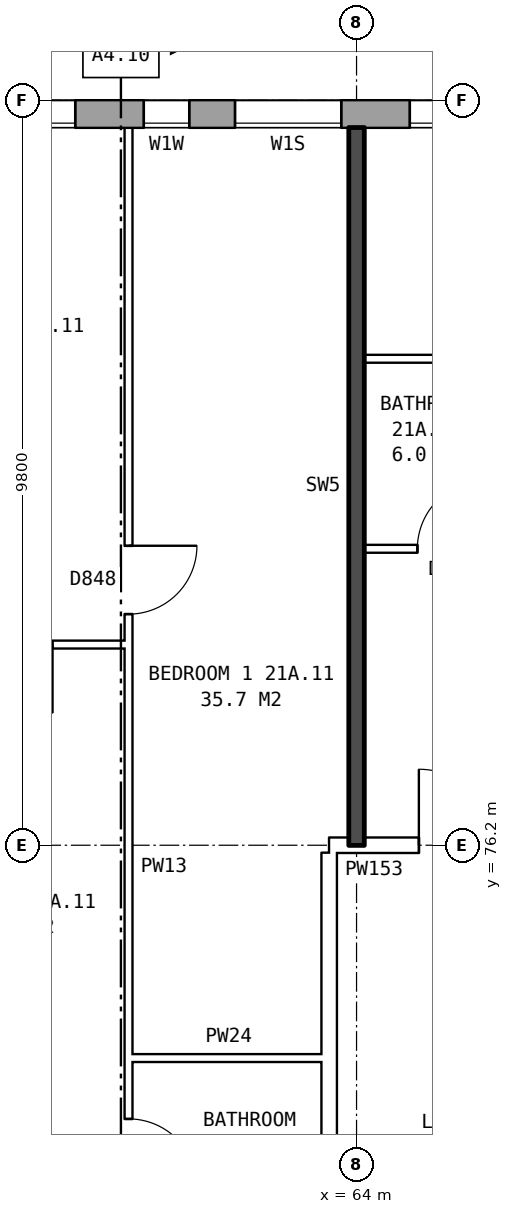
"""IFC4 building model, lengths in metres.
Left out: names, types, materials, properties, quantities, classifications, styles, units other than length and angle.
Written with IfcOpenShell. Run it as: python <this file> out.ifc"""

import sys

from ifc_helpers import new_model, si_unit, direction, frame, frame_2d, origin, place, context, subcontext, project, spatial, rectangle, extrude, element, fill, save


model = new_model("IFC4")
c1 = context("Model", 3, precision=1e-05, world=origin(), true_north=direction((0.0, 1.0)))
c2 = subcontext(c1, "Body", "Model", "MODEL_VIEW")
j1 = project(units=[si_unit("LENGTHUNIT", "METRE"), si_unit("PLANEANGLEUNIT", "RADIAN")], contexts=[c1])
p1 = place(None, origin())
s1 = spatial("IfcSite", under=j1, at=p1, CompositionType="ELEMENT")
p2 = place(p1, origin())
s2 = spatial("IfcBuilding", under=s1, at=p2, CompositionType="ELEMENT")
p3 = place(p2, frame((0.0, 0.0, 77.8)))
s3 = spatial("IfcBuildingStorey", under=s2, at=p3, CompositionType="ELEMENT", Elevation=77.8)
p4 = place(p3, frame((72.925, 85.82, 0.0), z_axis=(0.0, 0.0, 1.0), x_axis=(-1.0, 0.0, 0.0)))
e1 = element("IfcWall", 1, at=p4, inside=s3, PredefinedType="STANDARD", context=c2, shape_type="SweptSolid", body=[
    extrude(rectangle(XDim=46.601, YDim=0.36, at=frame_2d((23.3, 0.0))), origin(), (0.0, 0.0, 1.0), 2.85),
])
p5 = place(p4, frame((0.625, 0.0, 0.8)))
e2 = element("IfcOpeningElement", 2, at=p5, cuts=e1, PredefinedType="OPENING", context=c2, shape_type="SweptSolid", body=[
    extrude(rectangle(XDim=1.6, YDim=1.8, at=frame_2d((0.8, 0.9))), frame((0.0, 0.19, 0.0), z_axis=(0.0, -1.0, 0.0), x_axis=(1.0, 0.0, 0.0)), (0.0, 0.0, 1.0), 0.38),
])
p6 = place(p4, frame((3.625, 0.0, 0.8)))
e3 = element("IfcOpeningElement", 3, at=p6, cuts=e1, PredefinedType="OPENING", context=c2, shape_type="SweptSolid", body=[
    extrude(rectangle(XDim=1.6, YDim=1.8, at=frame_2d((0.8, 0.9))), frame((0.0, 0.19, 0.0), z_axis=(0.0, -1.0, 0.0), x_axis=(1.0, 0.0, 0.0)), (0.0, 0.0, 1.0), 0.38),
])
p7 = place(p4, frame((6.625, 0.0, 0.8)))
e4 = element("IfcOpeningElement", 4, at=p7, cuts=e1, PredefinedType="OPENING", context=c2, shape_type="SweptSolid", body=[
    extrude(rectangle(XDim=1.6, YDim=1.8, at=frame_2d((0.8, 0.9))), frame((0.0, 0.19, 0.0), z_axis=(0.0, -1.0, 0.0), x_axis=(1.0, 0.0, 0.0)), (0.0, 0.0, 1.0), 0.38),
])
p8 = place(p4, frame((9.125, 0.0, 1.65)))
e5 = element("IfcOpeningElement", 5, at=p8, cuts=e1, PredefinedType="OPENING", context=c2, shape_type="SweptSolid", body=[
    extrude(rectangle(XDim=1.4, YDim=0.9, at=frame_2d((0.7, 0.45))), frame((0.0, 0.19, 0.0), z_axis=(0.0, -1.0, 0.0), x_axis=(1.0, 0.0, 0.0)), (0.0, 0.0, 1.0), 0.38),
])
p9 = place(p4, frame((12.625, 0.0, 0.8)))
e6 = element("IfcOpeningElement", 6, at=p9, cuts=e1, PredefinedType="OPENING", context=c2, shape_type="SweptSolid", body=[
    extrude(rectangle(XDim=1.6, YDim=1.8, at=frame_2d((0.8, 0.9))), frame((0.0, 0.19, 0.0), z_axis=(0.0, -1.0, 0.0), x_axis=(1.0, 0.0, 0.0)), (0.0, 0.0, 1.0), 0.38),
])
p10 = place(p4, frame((15.625, 0.0, 0.8)))
e7 = element("IfcOpeningElement", 7, at=p10, cuts=e1, PredefinedType="OPENING", context=c2, shape_type="SweptSolid", body=[
    extrude(rectangle(XDim=1.6, YDim=1.8, at=frame_2d((0.8, 0.9))), frame((0.0, 0.19, 0.0), z_axis=(0.0, -1.0, 0.0), x_axis=(1.0, 0.0, 0.0)), (0.0, 0.0, 1.0), 0.38),
])
p11 = place(p4, frame((18.625, 0.0, 0.8)))
e8 = element("IfcOpeningElement", 8, at=p11, cuts=e1, PredefinedType="OPENING", context=c2, shape_type="SweptSolid", body=[
    extrude(rectangle(XDim=1.6, YDim=1.8, at=frame_2d((0.8, 0.9))), frame((0.0, 0.19, 0.0), z_axis=(0.0, -1.0, 0.0), x_axis=(1.0, 0.0, 0.0)), (0.0, 0.0, 1.0), 0.38),
])
p12 = place(p4, frame((21.625, 0.0, 0.8)))
e9 = element("IfcOpeningElement", 9, at=p12, cuts=e1, PredefinedType="OPENING", context=c2, shape_type="SweptSolid", body=[
    extrude(rectangle(XDim=1.6, YDim=1.8, at=frame_2d((0.8, 0.9))), frame((0.0, 0.19, 0.0), z_axis=(0.0, -1.0, 0.0), x_axis=(1.0, 0.0, 0.0)), (0.0, 0.0, 1.0), 0.38),
])
p13 = place(p4, frame((24.625, 0.0, 0.8)))
e10 = element("IfcOpeningElement", 10, at=p13, cuts=e1, PredefinedType="OPENING", context=c2, shape_type="SweptSolid", body=[
    extrude(rectangle(XDim=1.6, YDim=1.8, at=frame_2d((0.8, 0.9))), frame((0.0, 0.19, 0.0), z_axis=(0.0, -1.0, 0.0), x_axis=(1.0, 0.0, 0.0)), (0.0, 0.0, 1.0), 0.38),
])
p14 = place(p4, frame((27.625, 0.0, 0.8)))
e11 = element("IfcOpeningElement", 11, at=p14, cuts=e1, PredefinedType="OPENING", context=c2, shape_type="SweptSolid", body=[
    extrude(rectangle(XDim=1.6, YDim=1.8, at=frame_2d((0.8, 0.9))), frame((0.0, 0.19, 0.0), z_axis=(0.0, -1.0, 0.0), x_axis=(1.0, 0.0, 0.0)), (0.0, 0.0, 1.0), 0.38),
])
p15 = place(p4, frame((30.625, 0.0, 0.8)))
e12 = element("IfcOpeningElement", 12, at=p15, cuts=e1, PredefinedType="OPENING", context=c2, shape_type="SweptSolid", body=[
    extrude(rectangle(XDim=1.6, YDim=1.8, at=frame_2d((0.8, 0.9))), frame((0.0, 0.19, 0.0), z_axis=(0.0, -1.0, 0.0), x_axis=(1.0, 0.0, 0.0)), (0.0, 0.0, 1.0), 0.38),
])
p16 = place(p4, frame((33.125, 0.0, 0.75)))
e13 = element("IfcOpeningElement", 13, at=p16, cuts=e1, PredefinedType="OPENING", context=c2, shape_type="SweptSolid", body=[
    extrude(rectangle(XDim=0.6, YDim=1.8, at=frame_2d((0.3, 0.9))), frame((0.0, 0.19, 0.0), z_axis=(0.0, -1.0, 0.0), x_axis=(1.0, 0.0, 0.0)), (0.0, 0.0, 1.0), 0.38),
])
p17 = place(p4, frame((36.125, 0.0, 1.6)))
e14 = element("IfcOpeningElement", 14, at=p17, cuts=e1, PredefinedType="OPENING", context=c2, shape_type="SweptSolid", body=[
    extrude(rectangle(XDim=0.6, YDim=0.9, at=frame_2d((0.3, 0.45))), frame((0.0, 0.19, 0.0), z_axis=(0.0, -1.0, 0.0), x_axis=(1.0, 0.0, 0.0)), (0.0, 0.0, 1.0), 0.38),
])
p18 = place(p4, frame((39.625, 0.0, 0.8)))
e15 = element("IfcOpeningElement", 15, at=p18, cuts=e1, PredefinedType="OPENING", context=c2, shape_type="SweptSolid", body=[
    extrude(rectangle(XDim=1.6, YDim=1.8, at=frame_2d((0.8, 0.9))), frame((0.0, 0.19, 0.0), z_axis=(0.0, -1.0, 0.0), x_axis=(1.0, 0.0, 0.0)), (0.0, 0.0, 1.0), 0.38),
])
p19 = place(p4, frame((42.625, 0.0, 0.8)))
e16 = element("IfcOpeningElement", 16, at=p19, cuts=e1, PredefinedType="OPENING", context=c2, shape_type="SweptSolid", body=[
    extrude(rectangle(XDim=1.6, YDim=1.8, at=frame_2d((0.8, 0.9))), frame((0.0, 0.19, 0.0), z_axis=(0.0, -1.0, 0.0), x_axis=(1.0, 0.0, 0.0)), (0.0, 0.0, 1.0), 0.38),
])
p20 = place(p4, frame((11.125, 0.0, 0.15)))
e17 = element("IfcOpeningElement", 17, at=p20, cuts=e1, PredefinedType="OPENING", context=c2, shape_type="SweptSolid", body=[
    extrude(rectangle(XDim=0.6, YDim=0.9, at=frame_2d((0.3, 0.45))), frame((0.0, 0.19, 0.0), z_axis=(0.0, -1.0, 0.0), x_axis=(1.0, 0.0, 0.0)), (0.0, 0.0, 1.0), 0.38),
])
p21 = place(p4, frame((34.025, 0.0, 0.65)))
e18 = element("IfcOpeningElement", 18, at=p21, cuts=e1, PredefinedType="OPENING", context=c2, shape_type="SweptSolid", body=[
    extrude(rectangle(XDim=0.8, YDim=0.9, at=frame_2d((0.4, 0.45))), frame((0.0, 0.19, 0.0), z_axis=(0.0, -1.0, 0.0), x_axis=(1.0, 0.0, 0.0)), (0.0, 0.0, 1.0), 0.38),
])
p22 = place(p4, frame((37.025, 0.0, 0.8)))
e19 = element("IfcOpeningElement", 19, at=p22, cuts=e1, PredefinedType="OPENING", context=c2, shape_type="SweptSolid", body=[
    extrude(rectangle(XDim=1.6, YDim=1.8, at=frame_2d((0.8, 0.9))), frame((0.0, 0.19, 0.0), z_axis=(0.0, -1.0, 0.0), x_axis=(1.0, 0.0, 0.0)), (0.0, 0.0, 1.0), 0.38),
])
p23 = place(p3, frame((63.64, 63.9, 0.0), z_axis=(0.0, 0.0, 1.0), x_axis=(0.0, 1.0, 0.0)))
e20 = element("IfcWall", 20, at=p23, inside=s3, PredefinedType="PARTITIONING", context=c2, shape_type="SweptSolid", body=[
    extrude(rectangle(XDim=12.2, YDim=0.2, at=frame_2d((6.1, 0.0))), origin(), (0.0, 0.0, 1.0), 2.85),
])
p24 = place(p23, frame((5.1, 0.0, 0.0)))
e21 = element("IfcOpeningElement", 21, at=p24, cuts=e20, PredefinedType="OPENING", context=c2, shape_type="SweptSolid", body=[
    extrude(rectangle(XDim=2.0, YDim=2.1, at=frame_2d((1.0, 1.05))), frame((0.0, 0.11, 0.0), z_axis=(0.0, -1.0, 0.0), x_axis=(1.0, 0.0, 0.0)), (0.0, 0.0, 1.0), 0.22),
])
p25 = place(p3, frame((61.0, 73.4, 0.0), z_axis=(0.0, 0.0, 1.0), x_axis=(1.0, 0.0, 0.0)))
e22 = element("IfcWall", 22, at=p25, inside=s3, PredefinedType="PARTITIONING", context=c2, shape_type="SweptSolid", body=[
    extrude(rectangle(XDim=2.64, YDim=0.1, at=frame_2d((1.32, 0.0))), origin(), (0.0, 0.0, 1.0), 2.85),
])
p26 = place(p3, frame((63.64, 76.2, 0.0), z_axis=(0.0, 0.0, 1.0), x_axis=(1.0, 0.0, 0.0)))
e23 = element("IfcWall", 23, at=p26, inside=s3, PredefinedType="PARTITIONING", context=c2, shape_type="SweptSolid", body=[
    extrude(rectangle(XDim=3.0, YDim=0.2, at=frame_2d((1.5, 0.0))), origin(), (0.0, 0.0, 1.0), 2.85),
])
p27 = place(p26, frame((1.18, 0.0, 0.0)))
e24 = element("IfcOpeningElement", 24, at=p27, cuts=e23, PredefinedType="OPENING", context=c2, shape_type="SweptSolid", body=[
    extrude(rectangle(XDim=1.0, YDim=2.1, at=frame_2d((0.5, 1.05))), frame((0.0, 0.11, 0.0), z_axis=(0.0, -1.0, 0.0), x_axis=(1.0, 0.0, 0.0)), (0.0, 0.0, 1.0), 0.22),
])
p28 = place(p3, frame((58.1, 78.84, 0.0), z_axis=(0.0, 0.0, 1.0), x_axis=(1.0, 0.0, 0.0)))
e25 = element("IfcWall", 25, at=p28, inside=s3, PredefinedType="PARTITIONING", context=c2, shape_type="SweptSolid", body=[
    extrude(rectangle(XDim=2.9, YDim=0.1, at=frame_2d((1.45, 0.0))), origin(), (0.0, 0.0, 1.0), 2.85),
])
p29 = place(p28, frame((1.0, 0.0, 0.0)))
e26 = element("IfcOpeningElement", 26, at=p29, cuts=e25, PredefinedType="OPENING", context=c2, shape_type="SweptSolid", body=[
    extrude(rectangle(XDim=0.9, YDim=2.1, at=frame_2d((0.45, 1.05))), frame((0.0, 0.06, 0.0), z_axis=(0.0, -1.0, 0.0), x_axis=(1.0, 0.0, 0.0)), (0.0, 0.0, 1.0), 0.12),
])
p30 = place(p3, frame((64.1, 80.1, 0.0), z_axis=(0.0, 0.0, 1.0), x_axis=(1.0, 0.0, 0.0)))
e27 = element("IfcWall", 27, at=p30, inside=s3, PredefinedType="PARTITIONING", context=c2, shape_type="SweptSolid", body=[
    extrude(rectangle(XDim=5.8, YDim=0.1, at=frame_2d((2.9, 0.0))), origin(), (0.0, 0.0, 1.0), 2.85),
])
p31 = place(p30, frame((3.6, 0.0, 0.0)))
e28 = element("IfcOpeningElement", 28, at=p31, cuts=e27, PredefinedType="OPENING", context=c2, shape_type="SweptSolid", body=[
    extrude(rectangle(XDim=0.9, YDim=2.1, at=frame_2d((0.45, 1.05))), frame((0.0, 0.06, 0.0), z_axis=(0.0, -1.0, 0.0), x_axis=(1.0, 0.0, 0.0)), (0.0, 0.0, 1.0), 0.12),
])
p32 = place(p30, frame((0.7, 0.0, 0.0)))
e29 = element("IfcOpeningElement", 29, at=p32, cuts=e27, PredefinedType="OPENING", context=c2, shape_type="SweptSolid", body=[
    extrude(rectangle(XDim=0.9, YDim=2.1, at=frame_2d((0.45, 1.05))), frame((0.0, 0.06, 0.0), z_axis=(0.0, -1.0, 0.0), x_axis=(1.0, 0.0, 0.0)), (0.0, 0.0, 1.0), 0.12),
])
p33 = place(p3, frame((64.1, 82.6, 0.0), z_axis=(0.0, 0.0, 1.0), x_axis=(1.0, 0.0, 0.0)))
e30 = element("IfcWall", 30, at=p33, inside=s3, PredefinedType="PARTITIONING", context=c2, shape_type="SweptSolid", body=[
    extrude(rectangle(XDim=2.3, YDim=0.1, at=frame_2d((1.15, 0.0))), origin(), (0.0, 0.0, 1.0), 2.85),
])
p34 = place(p3, frame((61.0, 71.3, 0.0), z_axis=(0.0, 0.0, 1.0), x_axis=(0.0, 1.0, 0.0)))
e31 = element("IfcWall", 31, at=p34, inside=s3, PredefinedType="PARTITIONING", context=c2, shape_type="SweptSolid", body=[
    extrude(rectangle(XDim=14.34, YDim=0.1, at=frame_2d((7.17, 0.0))), origin(), (0.0, 0.0, 1.0), 2.85),
])
p35 = place(p34, frame((7.94, 0.0, 0.0)))
e32 = element("IfcOpeningElement", 32, at=p35, cuts=e31, PredefinedType="OPENING", context=c2, shape_type="SweptSolid", body=[
    extrude(rectangle(XDim=0.9, YDim=2.1, at=frame_2d((0.45, 1.05))), frame((0.0, 0.06, 0.0), z_axis=(0.0, -1.0, 0.0), x_axis=(1.0, 0.0, 0.0)), (0.0, 0.0, 1.0), 0.12),
])
p36 = place(p34, frame((0.4, 0.0, 0.0)))
e33 = element("IfcOpeningElement", 33, at=p36, cuts=e31, PredefinedType="OPENING", context=c2, shape_type="SweptSolid", body=[
    extrude(rectangle(XDim=0.9, YDim=2.1, at=frame_2d((0.45, 1.05))), frame((0.0, 0.06, 0.0), z_axis=(0.0, -1.0, 0.0), x_axis=(1.0, 0.0, 0.0)), (0.0, 0.0, 1.0), 0.12),
])
p37 = place(p3, frame((64.0, 76.2, 0.0), z_axis=(0.0, 0.0, 1.0), x_axis=(0.0, 1.0, 0.0)))
e34 = element("IfcWall", 34, at=p37, inside=s3, PredefinedType="SOLIDWALL", context=c2, shape_type="SweptSolid", body=[
    extrude(rectangle(XDim=9.44, YDim=0.2, at=frame_2d((4.72, 0.0))), origin(), (0.0, 0.0, 1.0), 2.85),
])
p38 = place(p7, origin())
e35 = element("IfcWindow", 35, at=p38, inside=s3, PartitioningType="SINGLE_PANEL", PredefinedType="WINDOW", context=c2, shape_type="SweptSolid", body=[
    extrude(rectangle(XDim=1.6, YDim=1.8, at=frame_2d((0.8, 0.9))), frame((0.0, 0.15, 0.0), z_axis=(0.0, -1.0, 0.0), x_axis=(1.0, 0.0, 0.0)), (0.0, 0.0, 1.0), 0.06),
])
fill(e4, e35)
p39 = place(p8, origin())
e36 = element("IfcWindow", 36, at=p39, inside=s3, PartitioningType="SINGLE_PANEL", PredefinedType="WINDOW", context=c2, shape_type="SweptSolid", body=[
    extrude(rectangle(XDim=1.4, YDim=0.9, at=frame_2d((0.7, 0.45))), frame((0.0, 0.15, 0.0), z_axis=(0.0, -1.0, 0.0), x_axis=(1.0, 0.0, 0.0)), (0.0, 0.0, 1.0), 0.06),
])
fill(e5, e36)
p40 = place(p9, origin())
e37 = element("IfcWindow", 37, at=p40, inside=s3, PartitioningType="SINGLE_PANEL", PredefinedType="WINDOW", context=c2, shape_type="SweptSolid", body=[
    extrude(rectangle(XDim=1.6, YDim=1.8, at=frame_2d((0.8, 0.9))), frame((0.0, 0.15, 0.0), z_axis=(0.0, -1.0, 0.0), x_axis=(1.0, 0.0, 0.0)), (0.0, 0.0, 1.0), 0.06),
])
fill(e6, e37)
p41 = place(p27, origin())
e38 = element("IfcDoor", 38, at=p41, inside=s3, OperationType="SINGLE_SWING_LEFT", PredefinedType="DOOR", context=c2, shape_type="SweptSolid", body=[
    extrude(rectangle(XDim=1.0, YDim=2.1, at=frame_2d((0.5, 1.05))), frame((0.0, 0.025, 0.0), z_axis=(0.0, -1.0, 0.0), x_axis=(1.0, 0.0, 0.0)), (0.0, 0.0, 1.0), 0.05),
])
fill(e24, e38)
p42 = place(p32, origin())
e39 = element("IfcDoor", 39, at=p42, inside=s3, OperationType="SINGLE_SWING_RIGHT", PredefinedType="DOOR", context=c2, shape_type="SweptSolid", body=[
    extrude(rectangle(XDim=0.9, YDim=2.1, at=frame_2d((0.45, 1.05))), frame((0.0, 0.025, 0.0), z_axis=(0.0, -1.0, 0.0), x_axis=(1.0, 0.0, 0.0)), (0.0, 0.0, 1.0), 0.05),
])
fill(e29, e39)
p43 = place(p35, frame((0.9, 0.0, 0.0), z_axis=(0.0, 0.0, 1.0), x_axis=(-1.0, 0.0, 0.0)))
e40 = element("IfcDoor", 40, at=p43, inside=s3, OperationType="SINGLE_SWING_LEFT", PredefinedType="DOOR", context=c2, shape_type="SweptSolid", body=[
    extrude(rectangle(XDim=0.9, YDim=2.1, at=frame_2d((0.45, 1.05))), frame((0.0, 0.025, 0.0), z_axis=(0.0, -1.0, 0.0), x_axis=(1.0, 0.0, 0.0)), (0.0, 0.0, 1.0), 0.05),
])
fill(e32, e40)
p44 = place(p36, frame((0.9, 0.0, 0.0), z_axis=(0.0, 0.0, 1.0), x_axis=(-1.0, 0.0, 0.0)))
e41 = element("IfcDoor", 41, at=p44, inside=s3, OperationType="SINGLE_SWING_RIGHT", PredefinedType="DOOR", context=c2, shape_type="SweptSolid", body=[
    extrude(rectangle(XDim=0.9, YDim=2.1, at=frame_2d((0.45, 1.05))), frame((0.0, 0.025, 0.0), z_axis=(0.0, -1.0, 0.0), x_axis=(1.0, 0.0, 0.0)), (0.0, 0.0, 1.0), 0.05),
])
fill(e33, e41)
p45 = place(p20, origin())
e42 = element("IfcWindow", 42, at=p45, inside=s3, PartitioningType="SINGLE_PANEL", PredefinedType="WINDOW", context=c2, shape_type="SweptSolid", body=[
    extrude(rectangle(XDim=0.6, YDim=0.9, at=frame_2d((0.3, 0.45))), frame((0.0, 0.15, 0.0), z_axis=(0.0, -1.0, 0.0), x_axis=(1.0, 0.0, 0.0)), (0.0, 0.0, 1.0), 0.06),
])
fill(e17, e42)
save(model, sys.argv[1])
